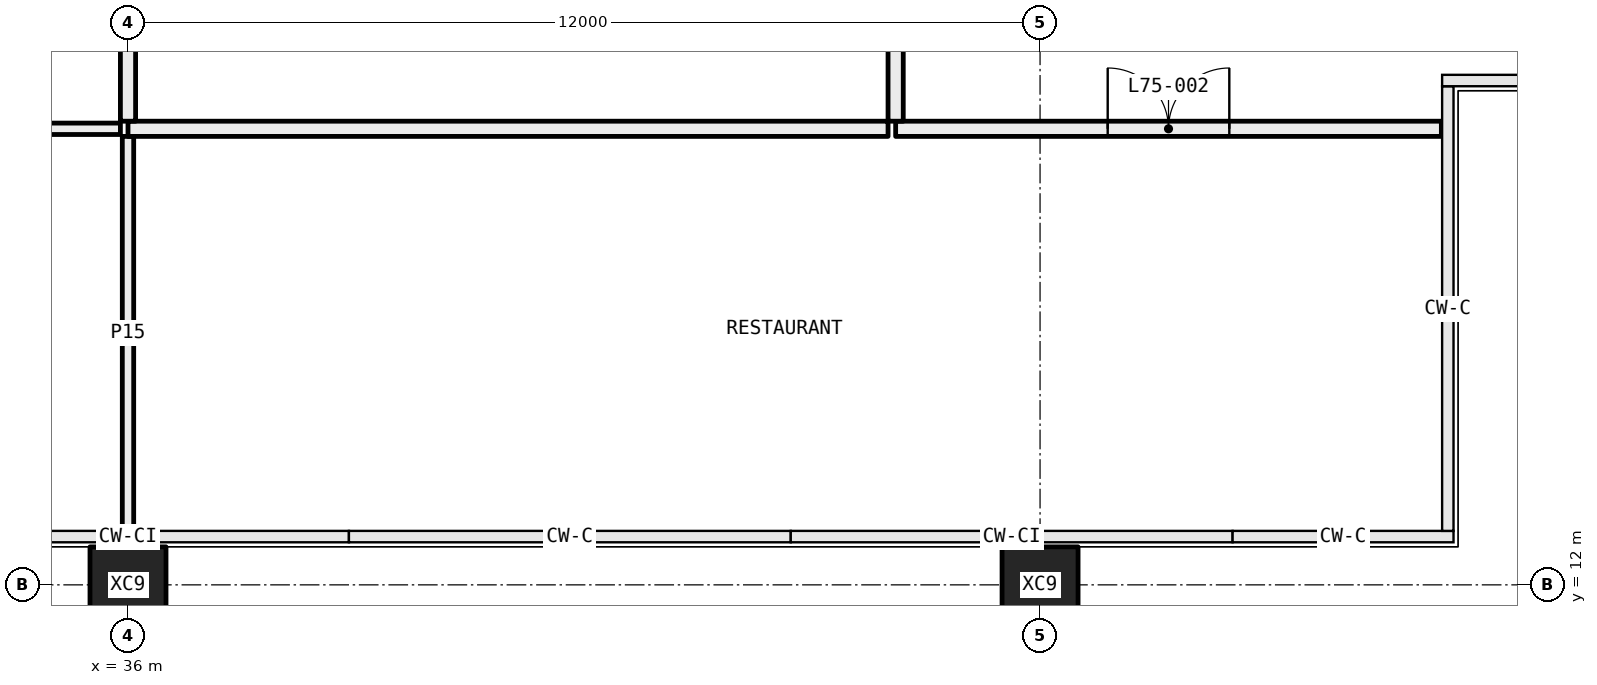
"""IFC4 building model, lengths in metres.
Left out: names, types, materials, properties, quantities, classifications, styles, units other than length and angle.
Written with IfcOpenShell. Run it as: python <this file> out.ifc"""

import sys

from ifc_helpers import new_model, si_unit, direction, frame, frame_2d, origin, origin_2d, place, context, subcontext, project, spatial, rectangle, hollow_rectangle, extrude, element, fill, save


model = new_model("IFC4")
c1 = context("Model", 3, precision=1e-05, world=origin(), true_north=direction((0.0, 1.0)))
c2 = subcontext(c1, "Body", "Model", "MODEL_VIEW")
j1 = project(units=[si_unit("LENGTHUNIT", "METRE"), si_unit("PLANEANGLEUNIT", "RADIAN")], contexts=[c1])
p1 = place(None, origin())
s1 = spatial("IfcSite", under=j1, at=p1, CompositionType="ELEMENT")
p2 = place(p1, origin())
s2 = spatial("IfcBuilding", under=s1, at=p2, CompositionType="ELEMENT")
p3 = place(p2, frame((0.0, 0.0, 277.95)))
s3 = spatial("IfcBuildingStorey", under=s2, at=p3, CompositionType="ELEMENT", Elevation=277.95)
for number, where, z_axis, x_axis in (
    (1, (36.0, 12.0, -0.4), (0.0, 0.0, 1.0), (1.0, 0.0, 0.0)),
    (2, (48.0, 12.0, -0.4), (0.0, 0.0, 1.0), (1.0, 0.0, 0.0)),
):
    element("IfcColumn", number, at=place(p3, frame(where, z_axis=z_axis, x_axis=x_axis)), inside=s3, PredefinedType="COLUMN", context=c2, shape_type="SweptSolid", body=[
        extrude(hollow_rectangle(XDim=1.0, YDim=1.0, WallThickness=0.036, at=origin_2d()), origin(), (0.0, 0.0, 1.0), 5.4),
    ])
p4 = place(p3, frame((46.1, 18.0, 0.0), z_axis=(0.0, 0.0, 1.0), x_axis=(1.0, 0.0, 0.0)))
e3 = element("IfcWall", 3, at=p4, inside=s3, PredefinedType="PARTITIONING", context=c2, shape_type="SweptSolid", body=[
    extrude(rectangle(XDim=7.18, YDim=0.2, at=frame_2d((3.59, 0.0))), origin(), (0.0, 0.0, 1.0), 5.0),
])
p5 = place(p4, frame((2.79, 0.0, 0.0)))
e4 = element("IfcOpeningElement", 4, at=p5, cuts=e3, PredefinedType="OPENING", context=c2, shape_type="SweptSolid", body=[
    extrude(rectangle(XDim=1.6, YDim=2.1, at=frame_2d((0.8, 1.05))), frame((0.0, 0.11, 0.0), z_axis=(0.0, -1.0, 0.0), x_axis=(1.0, 0.0, 0.0)), (0.0, 0.0, 1.0), 0.22),
])
p6 = place(p3, frame((46.1, 28.7, 0.0), z_axis=(0.0, 0.0, 1.0), x_axis=(0.0, -1.0, 0.0)))
e5 = element("IfcWall", 5, at=p6, inside=s3, PredefinedType="PARTITIONING", context=c2, shape_type="SweptSolid", body=[
    extrude(rectangle(XDim=10.6, YDim=0.2, at=frame_2d((5.3, 0.0))), origin(), (0.0, 0.0, 1.0), 5.0),
])
p7 = place(p6, frame((4.85, 0.0, 0.0)))
e6 = element("IfcOpeningElement", 6, at=p7, cuts=e5, PredefinedType="OPENING", context=c2, shape_type="SweptSolid", body=[
    extrude(rectangle(XDim=0.9, YDim=2.1, at=frame_2d((0.45, 1.05))), frame((0.0, 0.11, 0.0), z_axis=(0.0, -1.0, 0.0), x_axis=(1.0, 0.0, 0.0)), (0.0, 0.0, 1.0), 0.22),
])
p8 = place(p3, frame((36.0, 12.72, 0.0), z_axis=(0.0, 0.0, 1.0), x_axis=(0.0, 1.0, 0.0)))
e7 = element("IfcWall", 7, at=p8, inside=s3, PredefinedType="PARTITIONING", context=c2, shape_type="SweptSolid", body=[
    extrude(rectangle(XDim=5.18, YDim=0.15, at=frame_2d((2.59, 0.0))), origin(), (0.0, 0.0, 1.0), 4.1),
])
p9 = place(p3, frame((35.9, 18.0, 0.0), z_axis=(0.0, 0.0, 1.0), x_axis=(-1.0, 0.0, 0.0)))
e8 = element("IfcWall", 8, at=p9, inside=s3, PredefinedType="PARTITIONING", context=c2, shape_type="SweptSolid", body=[
    extrude(rectangle(XDim=9.9, YDim=0.15, at=frame_2d((4.95, 0.0))), origin(), (0.0, 0.0, 1.0), 5.0),
])
p10 = place(p3, frame((46.0, 18.0, 0.0), z_axis=(0.0, 0.0, 1.0), x_axis=(-1.0, 0.0, 0.0)))
e9 = element("IfcWall", 9, at=p10, inside=s3, PredefinedType="PARTITIONING", context=c2, shape_type="SweptSolid", body=[
    extrude(rectangle(XDim=10.0, YDim=0.2, at=frame_2d((5.0, 0.0))), origin(), (0.0, 0.0, 1.0), 5.0),
])
p11 = place(p3, frame((36.0, 18.1, 0.0), z_axis=(0.0, 0.0, 1.0), x_axis=(0.0, 1.0, 0.0)))
e10 = element("IfcWall", 10, at=p11, inside=s3, PredefinedType="PARTITIONING", context=c2, shape_type="SweptSolid", body=[
    extrude(rectangle(XDim=5.35, YDim=0.2, at=frame_2d((2.675, 0.0))), origin(), (0.0, 0.0, 1.0), 4.1),
])
p12 = place(p5, origin())
e11 = element("IfcDoor", 11, at=p12, inside=s3, OperationType="DOUBLE_DOOR_SINGLE_SWING", PredefinedType="DOOR", context=c2, shape_type="SweptSolid", body=[
    extrude(rectangle(XDim=1.6, YDim=2.1, at=frame_2d((0.8, 1.05))), frame((0.0, 0.025, 0.0), z_axis=(0.0, -1.0, 0.0), x_axis=(1.0, 0.0, 0.0)), (0.0, 0.0, 1.0), 0.05),
])
fill(e4, e11)
save(model, sys.argv[1])
